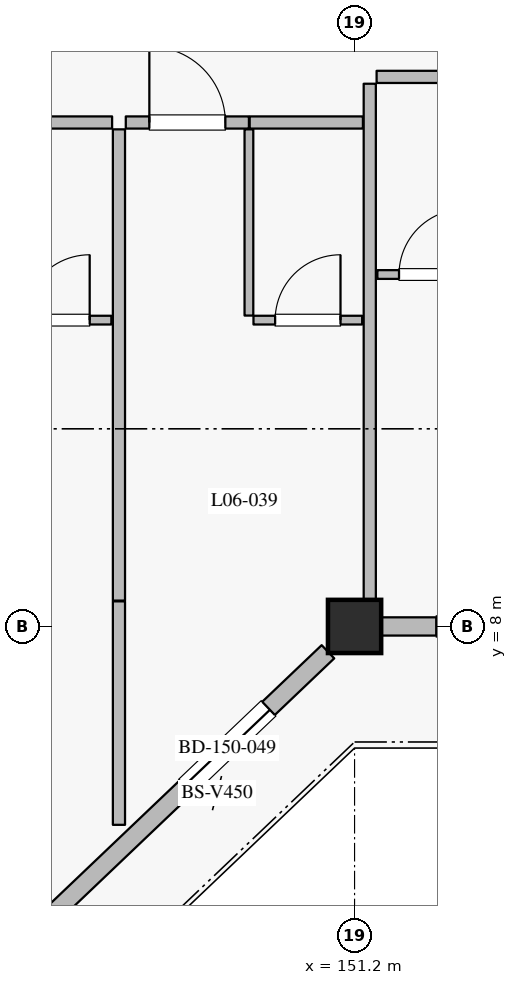
"""IFC4 building model, lengths in metres.
Left out: names, types, materials, properties, quantities, classifications, styles, units other than length and angle.
Written with IfcOpenShell. Run it as: python <this file> out.ifc"""

import sys

from ifc_helpers import new_model, si_unit, direction, frame, frame_2d, origin, origin_2d, place, context, subcontext, project, spatial, rectangle, extrude, element, fill, save


model = new_model("IFC4")
c1 = context("Model", 3, precision=1e-05, world=origin(), true_north=direction((0.0, 1.0)))
c2 = subcontext(c1, "Body", "Model", "MODEL_VIEW")
j1 = project(units=[si_unit("LENGTHUNIT", "METRE"), si_unit("PLANEANGLEUNIT", "RADIAN")], contexts=[c1])
p1 = place(None, origin())
s1 = spatial("IfcSite", under=j1, at=p1, CompositionType="ELEMENT")
p2 = place(p1, origin())
s2 = spatial("IfcBuilding", under=s1, at=p2, CompositionType="ELEMENT")
p3 = place(p2, frame((0.0, 0.0, 28.8)))
s3 = spatial("IfcBuildingStorey", under=s2, at=p3, CompositionType="ELEMENT", Elevation=28.8)
p4 = place(p3, frame((151.2, 8.0, 0.0), z_axis=(0.0, 0.0, 1.0), x_axis=(1.0, 0.0, 0.0)))
e1 = element("IfcColumn", 1, at=p4, inside=s3, PredefinedType="COLUMN", context=c2, shape_type="SweptSolid", body=[
    extrude(rectangle(XDim=0.7, YDim=0.7, at=origin_2d()), origin(), (0.0, 0.0, 1.0), 3.6),
])
p5 = place(p3, frame((150.85, 7.667, 0.0), z_axis=(0.0, 0.0, 1.0), x_axis=(-0.724116091282, -0.689678103427, 0.0)))
e2 = element("IfcWall", 2, at=p5, inside=s3, PredefinedType="SOLIDWALL", context=c2, shape_type="SweptSolid", body=[
    extrude(rectangle(XDim=10.634, YDim=0.24, at=frame_2d((5.317, 0.0))), origin(), (0.0, 0.0, 1.0), 2.93),
])
p6 = place(p5, frame((1.08, 0.0, 0.0)))
e3 = element("IfcOpeningElement", 3, at=p6, cuts=e2, PredefinedType="OPENING", context=c2, shape_type="SweptSolid", body=[
    extrude(rectangle(XDim=1.5, YDim=2.25, at=frame_2d((0.75, 1.125))), frame((0.0, 0.13, 0.0), z_axis=(0.0, -1.0, 0.0), x_axis=(1.0, 0.0, 0.0)), (0.0, 0.0, 1.0), 0.26),
])
p7 = place(p5, frame((5.276, 0.0, 0.8)))
e4 = element("IfcOpeningElement", 4, at=p7, cuts=e2, PredefinedType="OPENING", context=c2, shape_type="SweptSolid", body=[
    extrude(rectangle(XDim=1.6, YDim=1.6, at=frame_2d((0.8, 0.8))), frame((0.0, 0.13, 0.0), z_axis=(0.0, -1.0, 0.0), x_axis=(1.0, 0.0, 0.0)), (0.0, 0.0, 1.0), 0.26),
])
p8 = place(p5, frame((8.764, 0.0, 0.8)))
e5 = element("IfcOpeningElement", 5, at=p8, cuts=e2, PredefinedType="OPENING", context=c2, shape_type="SweptSolid", body=[
    extrude(rectangle(XDim=1.6, YDim=1.6, at=frame_2d((0.8, 0.8))), frame((0.0, 0.13, 0.0), z_axis=(0.0, -1.0, 0.0), x_axis=(1.0, 0.0, 0.0)), (0.0, 0.0, 1.0), 0.26),
])
p9 = place(p3, frame((159.25, 8.0, 0.0), z_axis=(0.0, 0.0, 1.0), x_axis=(-1.0, 0.0, 0.0)))
e6 = element("IfcWall", 6, at=p9, inside=s3, PredefinedType="SOLIDWALL", context=c2, shape_type="SweptSolid", body=[
    extrude(rectangle(XDim=7.7, YDim=0.24, at=frame_2d((3.85, 0.0))), origin(), (0.0, 0.0, 1.0), 2.93),
])
p10 = place(p9, frame((2.15, 0.0, 0.0)))
e7 = element("IfcOpeningElement", 7, at=p10, cuts=e6, PredefinedType="OPENING", context=c2, shape_type="SweptSolid", body=[
    extrude(rectangle(XDim=1.5, YDim=2.25, at=frame_2d((0.75, 1.125))), frame((0.0, 0.13, 0.0), z_axis=(0.0, -1.0, 0.0), x_axis=(1.0, 0.0, 0.0)), (0.0, 0.0, 1.0), 0.26),
])
p11 = place(p9, frame((5.375, 0.0, 0.8)))
e8 = element("IfcOpeningElement", 8, at=p11, cuts=e6, PredefinedType="OPENING", context=c2, shape_type="SweptSolid", body=[
    extrude(rectangle(XDim=1.6, YDim=1.6, at=frame_2d((0.8, 0.8))), frame((0.0, 0.13, 0.0), z_axis=(0.0, -1.0, 0.0), x_axis=(1.0, 0.0, 0.0)), (0.0, 0.0, 1.0), 0.26),
])
p12 = place(p3, frame((146.52, 14.63, 0.0), z_axis=(0.0, 0.0, 1.0), x_axis=(1.0, 0.0, 0.0)))
e9 = element("IfcWall", 9, at=p12, inside=s3, PredefinedType="PARTITIONING", context=c2, shape_type="SweptSolid", body=[
    extrude(rectangle(XDim=1.49, YDim=0.16, at=frame_2d((0.745, 0.0))), origin(), (0.0, 0.0, 1.0), 3.365),
])
p13 = place(p3, frame((146.57, 12.03, 0.0), z_axis=(0.0, 0.0, 1.0), x_axis=(1.0, 0.0, 0.0)))
e10 = element("IfcWall", 10, at=p13, inside=s3, PredefinedType="PARTITIONING", context=c2, shape_type="SweptSolid", body=[
    extrude(rectangle(XDim=1.43, YDim=0.115, at=frame_2d((0.715, 0.0))), origin(), (0.0, 0.0, 1.0), 3.365),
])
p14 = place(p13, frame((0.285, 0.0, 0.0)))
e11 = element("IfcOpeningElement", 11, at=p14, cuts=e10, PredefinedType="OPENING", context=c2, shape_type="SweptSolid", body=[
    extrude(rectangle(XDim=0.86, YDim=2.12, at=frame_2d((0.43, 1.06))), frame((0.0, 0.067, 0.0), z_axis=(0.0, -1.0, 0.0), x_axis=(1.0, 0.0, 0.0)), (0.0, 0.0, 1.0), 0.135),
])
p15 = place(p3, frame((148.1, 5.39, 0.0), z_axis=(0.0, 0.0, 1.0), x_axis=(0.0, 1.0, 0.0)))
e12 = element("IfcWall", 12, at=p15, inside=s3, PredefinedType="PARTITIONING", context=c2, shape_type="SweptSolid", body=[
    extrude(rectangle(XDim=2.94, YDim=0.16, at=frame_2d((1.47, 0.0))), origin(), (0.0, 0.0, 1.0), 3.365),
])
p16 = place(p3, frame((148.19, 14.63, 0.0), z_axis=(0.0, 0.0, 1.0), x_axis=(1.0, 0.0, 0.0)))
e13 = element("IfcWall", 13, at=p16, inside=s3, PredefinedType="PARTITIONING", context=c2, shape_type="SweptSolid", body=[
    extrude(rectangle(XDim=1.62, YDim=0.16, at=frame_2d((0.81, 0.0))), origin(), (0.0, 0.0, 1.0), 3.365),
])
p17 = place(p16, frame((0.31, 0.0, 0.0)))
e14 = element("IfcOpeningElement", 14, at=p17, cuts=e13, PredefinedType="OPENING", context=c2, shape_type="SweptSolid", body=[
    extrude(rectangle(XDim=1.0, YDim=2.25, at=frame_2d((0.5, 1.125))), frame((0.0, 0.09, 0.0), z_axis=(0.0, -1.0, 0.0), x_axis=(1.0, 0.0, 0.0)), (0.0, 0.0, 1.0), 0.18),
])
p18 = place(p3, frame((149.82, 14.63, 0.0), z_axis=(0.0, 0.0, 1.0), x_axis=(1.0, 0.0, 0.0)))
e15 = element("IfcWall", 15, at=p18, inside=s3, PredefinedType="PARTITIONING", context=c2, shape_type="SweptSolid", body=[
    extrude(rectangle(XDim=1.49, YDim=0.16, at=frame_2d((0.745, 0.0))), origin(), (0.0, 0.0, 1.0), 3.365),
])
p19 = place(p3, frame((149.81, 12.09, 0.0), z_axis=(0.0, 0.0, 1.0), x_axis=(0.0, 1.0, 0.0)))
e16 = element("IfcWall", 16, at=p19, inside=s3, PredefinedType="PARTITIONING", context=c2, shape_type="SweptSolid", body=[
    extrude(rectangle(XDim=2.45, YDim=0.115, at=frame_2d((1.225, 0.0))), origin(), (0.0, 0.0, 1.0), 3.365),
])
p20 = place(p3, frame((149.87, 12.03, 0.0), z_axis=(0.0, 0.0, 1.0), x_axis=(1.0, 0.0, 0.0)))
e17 = element("IfcWall", 17, at=p20, inside=s3, PredefinedType="PARTITIONING", context=c2, shape_type="SweptSolid", body=[
    extrude(rectangle(XDim=1.43, YDim=0.115, at=frame_2d((0.715, 0.0))), origin(), (0.0, 0.0, 1.0), 3.365),
])
p21 = place(p20, frame((0.285, 0.0, 0.0)))
e18 = element("IfcOpeningElement", 18, at=p21, cuts=e17, PredefinedType="OPENING", context=c2, shape_type="SweptSolid", body=[
    extrude(rectangle(XDim=0.86, YDim=2.12, at=frame_2d((0.43, 1.06))), frame((0.0, 0.067, 0.0), z_axis=(0.0, -1.0, 0.0), x_axis=(1.0, 0.0, 0.0)), (0.0, 0.0, 1.0), 0.135),
])
p22 = place(p3, frame((148.1, 8.34, 0.0), z_axis=(0.0, 0.0, 1.0), x_axis=(0.0, 1.0, 0.0)))
e19 = element("IfcWall", 19, at=p22, inside=s3, PredefinedType="PARTITIONING", context=c2, shape_type="SweptSolid", body=[
    extrude(rectangle(XDim=6.2, YDim=0.16, at=frame_2d((3.1, 0.0))), origin(), (0.0, 0.0, 1.0), 3.365),
])
p23 = place(p3, frame((151.49, 15.23, 0.0), z_axis=(0.0, 0.0, 1.0), x_axis=(1.0, 0.0, 0.0)))
e20 = element("IfcWall", 20, at=p23, inside=s3, PredefinedType="PARTITIONING", context=c2, shape_type="SweptSolid", body=[
    extrude(rectangle(XDim=1.49, YDim=0.16, at=frame_2d((0.745, 0.0))), origin(), (0.0, 0.0, 1.0), 3.365),
])
p24 = place(p3, frame((151.5, 12.63, 0.0), z_axis=(0.0, 0.0, 1.0), x_axis=(1.0, 0.0, 0.0)))
e21 = element("IfcWall", 21, at=p24, inside=s3, PredefinedType="PARTITIONING", context=c2, shape_type="SweptSolid", body=[
    extrude(rectangle(XDim=1.43, YDim=0.115, at=frame_2d((0.715, 0.0))), origin(), (0.0, 0.0, 1.0), 3.365),
])
p25 = place(p24, frame((0.285, 0.0, 0.0)))
e22 = element("IfcOpeningElement", 22, at=p25, cuts=e21, PredefinedType="OPENING", context=c2, shape_type="SweptSolid", body=[
    extrude(rectangle(XDim=0.86, YDim=2.12, at=frame_2d((0.43, 1.06))), frame((0.0, 0.067, 0.0), z_axis=(0.0, -1.0, 0.0), x_axis=(1.0, 0.0, 0.0)), (0.0, 0.0, 1.0), 0.135),
])
p26 = place(p3, frame((151.4, 8.34, 0.0), z_axis=(0.0, 0.0, 1.0), x_axis=(0.0, 1.0, 0.0)))
e23 = element("IfcWall", 23, at=p26, inside=s3, PredefinedType="PARTITIONING", context=c2, shape_type="SweptSolid", body=[
    extrude(rectangle(XDim=6.8, YDim=0.16, at=frame_2d((3.4, 0.0))), origin(), (0.0, 0.0, 1.0), 2.73),
])
p27 = place(p6, origin())
e24 = element("IfcDoor", 24, at=p27, inside=s3, OperationType="SLIDING_TO_LEFT", PredefinedType="DOOR", context=c2, shape_type="SweptSolid", body=[
    extrude(rectangle(XDim=1.5, YDim=2.25, at=frame_2d((0.75, 1.125))), frame((0.0, 0.025, 0.0), z_axis=(0.0, -1.0, 0.0), x_axis=(1.0, 0.0, 0.0)), (0.0, 0.0, 1.0), 0.05),
])
fill(e3, e24)
p28 = place(p11, origin())
e25 = element("IfcWindow", 25, at=p28, inside=s3, PartitioningType="SINGLE_PANEL", PredefinedType="WINDOW", context=c2, shape_type="SweptSolid", body=[
    extrude(rectangle(XDim=1.6, YDim=1.6, at=frame_2d((0.8, 0.8))), frame((0.0, 0.03, 0.0), z_axis=(0.0, -1.0, 0.0), x_axis=(1.0, 0.0, 0.0)), (0.0, 0.0, 1.0), 0.06),
])
fill(e8, e25)
p29 = place(p14, origin())
e26 = element("IfcDoor", 26, at=p29, inside=s3, OperationType="SINGLE_SWING_RIGHT", PredefinedType="DOOR", context=c2, shape_type="SweptSolid", body=[
    extrude(rectangle(XDim=0.86, YDim=2.12, at=frame_2d((0.43, 1.06))), frame((0.0, 0.025, 0.0), z_axis=(0.0, -1.0, 0.0), x_axis=(1.0, 0.0, 0.0)), (0.0, 0.0, 1.0), 0.05),
])
fill(e11, e26)
p30 = place(p17, origin())
e27 = element("IfcDoor", 27, at=p30, inside=s3, OperationType="SINGLE_SWING_LEFT", PredefinedType="DOOR", context=c2, shape_type="SweptSolid", body=[
    extrude(rectangle(XDim=1.0, YDim=2.25, at=frame_2d((0.5, 1.125))), frame((0.0, 0.025, 0.0), z_axis=(0.0, -1.0, 0.0), x_axis=(1.0, 0.0, 0.0)), (0.0, 0.0, 1.0), 0.05),
])
fill(e14, e27)
p31 = place(p21, origin())
e28 = element("IfcDoor", 28, at=p31, inside=s3, OperationType="SINGLE_SWING_RIGHT", PredefinedType="DOOR", context=c2, shape_type="SweptSolid", body=[
    extrude(rectangle(XDim=0.86, YDim=2.12, at=frame_2d((0.43, 1.06))), frame((0.0, 0.025, 0.0), z_axis=(0.0, -1.0, 0.0), x_axis=(1.0, 0.0, 0.0)), (0.0, 0.0, 1.0), 0.05),
])
fill(e18, e28)
p32 = place(p25, origin())
e29 = element("IfcDoor", 29, at=p32, inside=s3, OperationType="SINGLE_SWING_RIGHT", PredefinedType="DOOR", context=c2, shape_type="SweptSolid", body=[
    extrude(rectangle(XDim=0.86, YDim=2.12, at=frame_2d((0.43, 1.06))), frame((0.0, 0.025, 0.0), z_axis=(0.0, -1.0, 0.0), x_axis=(1.0, 0.0, 0.0)), (0.0, 0.0, 1.0), 0.05),
])
fill(e22, e29)
save(model, sys.argv[1])
